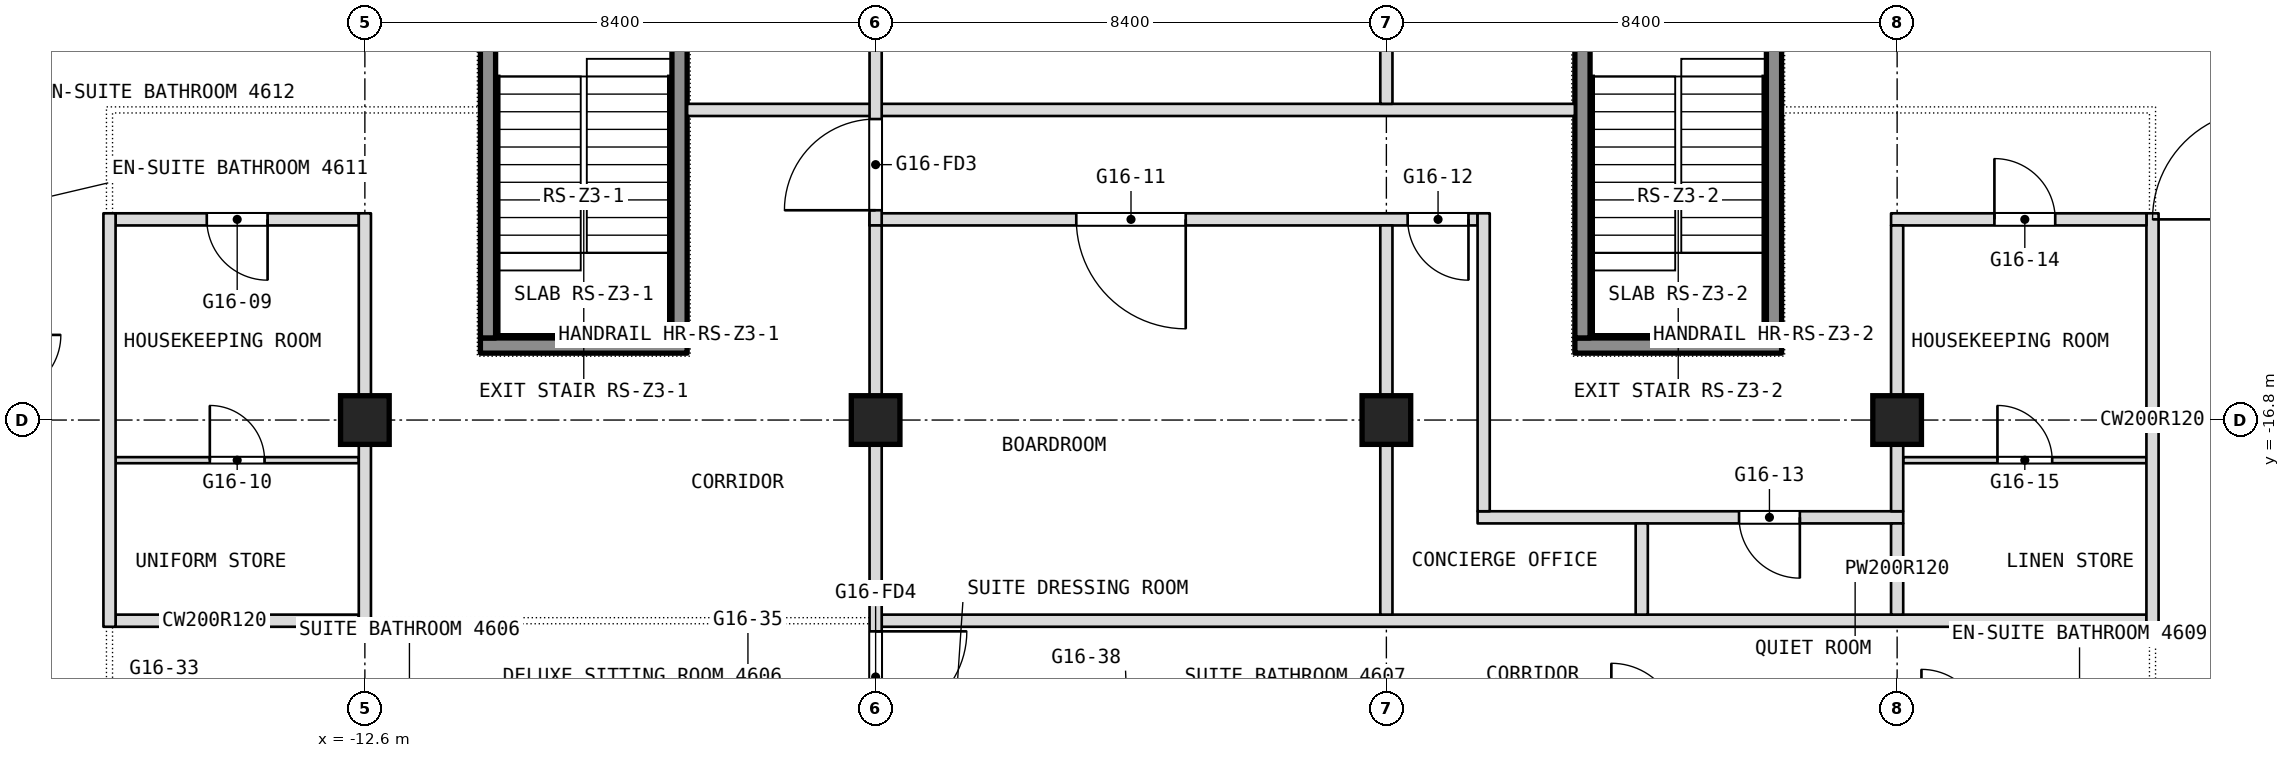
"""IFC4 building model, lengths in metres.
Left out: names, types, materials, properties, quantities, classifications, styles, units other than length and angle.
Written with IfcOpenShell. Run it as: python <this file> out.ifc"""

import sys

from ifc_helpers import new_model, si_unit, direction, frame, frame_2d, origin, origin_2d, place, context, subcontext, project, spatial, rectangle, extrude, element, fill, save


model = new_model("IFC4")
c1 = context("Model", 3, precision=1e-05, world=origin(), true_north=direction((0.0, 1.0)))
c2 = subcontext(c1, "Body", "Model", "MODEL_VIEW")
j1 = project(units=[si_unit("LENGTHUNIT", "METRE"), si_unit("PLANEANGLEUNIT", "RADIAN")], contexts=[c1])
p1 = place(None, origin())
s1 = spatial("IfcSite", under=j1, at=p1, CompositionType="ELEMENT")
p2 = place(p1, origin())
s2 = spatial("IfcBuilding", under=s1, at=p2, CompositionType="ELEMENT")
p3 = place(p2, frame((0.0, 0.0, 202.1)))
s3 = spatial("IfcBuildingStorey", under=s2, at=p3, CompositionType="ELEMENT", Elevation=202.1)
for number, where, z_axis, x_axis in (
    (1, (-12.6, -16.8, 0.0), (0.0, 0.0, 1.0), (1.0, 0.0, 0.0)),
    (2, (-4.2, -16.8, 0.0), (0.0, 0.0, 1.0), (1.0, 0.0, 0.0)),
    (3, (4.2, -16.8, 0.0), (0.0, 0.0, 1.0), (1.0, 0.0, 0.0)),
    (4, (12.6, -16.8, 0.0), (0.0, 0.0, 1.0), (1.0, 0.0, 0.0)),
):
    element("IfcColumn", number, at=place(p3, frame(where, z_axis=z_axis, x_axis=x_axis)), inside=s3, PredefinedType="COLUMN", context=c2, shape_type="SweptSolid", body=[
        extrude(rectangle(XDim=0.8, YDim=0.8, at=origin_2d()), origin(), (0.0, 0.0, 1.0), 3.6),
    ])
p4 = place(p3, frame((-16.7, -20.1, 0.0), z_axis=(0.0, 0.0, 1.0), x_axis=(1.0, 0.0, 0.0)))
e5 = element("IfcWall", 5, at=p4, inside=s3, PredefinedType="PARTITIONING", context=c2, shape_type="SweptSolid", body=[
    extrude(rectangle(XDim=4.0, YDim=0.2, at=frame_2d((2.0, 0.0))), origin(), (0.0, 0.0, 1.0), 3.34),
])
p5 = place(p3, frame((-4.1, -20.1, 0.0), z_axis=(0.0, 0.0, 1.0), x_axis=(1.0, 0.0, 0.0)))
e6 = element("IfcWall", 6, at=p5, inside=s3, PredefinedType="PARTITIONING", context=c2, shape_type="SweptSolid", body=[
    extrude(rectangle(XDim=20.8, YDim=0.2, at=frame_2d((10.4, 0.0))), origin(), (0.0, 0.0, 1.0), 3.34),
])
p6 = place(p3, frame((5.7, -18.4, 0.0), z_axis=(0.0, 0.0, 1.0), x_axis=(1.0, 0.0, 0.0)))
e7 = element("IfcWall", 7, at=p6, inside=s3, PredefinedType="PARTITIONING", context=c2, shape_type="SweptSolid", body=[
    extrude(rectangle(XDim=7.0, YDim=0.2, at=frame_2d((3.5, 0.0))), origin(), (0.0, 0.0, 1.0), 3.34),
])
p7 = place(p6, frame((4.3, 0.0, 0.0)))
e8 = element("IfcOpeningElement", 8, at=p7, cuts=e7, PredefinedType="OPENING", context=c2, shape_type="SweptSolid", body=[
    extrude(rectangle(XDim=1.0, YDim=2.1, at=frame_2d((0.5, 1.05))), frame((0.0, 0.1, 0.0), z_axis=(0.0, -1.0, 0.0), x_axis=(1.0, 0.0, 0.0)), (0.0, 0.0, 1.0), 0.2),
])
p8 = place(p3, frame((-16.7, -17.46, 0.0), z_axis=(0.0, 0.0, 1.0), x_axis=(1.0, 0.0, 0.0)))
e9 = element("IfcWall", 9, at=p8, inside=s3, PredefinedType="PARTITIONING", context=c2, shape_type="SweptSolid", body=[
    extrude(rectangle(XDim=4.0, YDim=0.1, at=frame_2d((2.0, 0.0))), origin(), (0.0, 0.0, 1.0), 3.34),
])
p9 = place(p8, frame((1.55, 0.0, 0.0)))
e10 = element("IfcOpeningElement", 10, at=p9, cuts=e9, PredefinedType="OPENING", context=c2, shape_type="SweptSolid", body=[
    extrude(rectangle(XDim=0.9, YDim=2.1, at=frame_2d((0.45, 1.05))), frame((0.0, 0.05, 0.0), z_axis=(0.0, -1.0, 0.0), x_axis=(1.0, 0.0, 0.0)), (0.0, 0.0, 1.0), 0.1),
])
p10 = place(p3, frame((12.7, -17.46, 0.0), z_axis=(0.0, 0.0, 1.0), x_axis=(1.0, 0.0, 0.0)))
e11 = element("IfcWall", 11, at=p10, inside=s3, PredefinedType="PARTITIONING", context=c2, shape_type="SweptSolid", body=[
    extrude(rectangle(XDim=4.0, YDim=0.1, at=frame_2d((2.0, 0.0))), origin(), (0.0, 0.0, 1.0), 3.34),
])
p11 = place(p10, frame((1.55, 0.0, 0.0)))
e12 = element("IfcOpeningElement", 12, at=p11, cuts=e11, PredefinedType="OPENING", context=c2, shape_type="SweptSolid", body=[
    extrude(rectangle(XDim=0.9, YDim=2.1, at=frame_2d((0.45, 1.05))), frame((0.0, 0.05, 0.0), z_axis=(0.0, -1.0, 0.0), x_axis=(1.0, 0.0, 0.0)), (0.0, 0.0, 1.0), 0.1),
])
p12 = place(p3, frame((16.8, -20.2, 0.0), z_axis=(0.0, 0.0, 1.0), x_axis=(0.0, 1.0, 0.0)))
e13 = element("IfcWall", 13, at=p12, inside=s3, PredefinedType="PARTITIONING", context=c2, shape_type="SweptSolid", body=[
    extrude(rectangle(XDim=6.8, YDim=0.2, at=frame_2d((3.4, 0.0))), origin(), (0.0, 0.0, 1.0), 3.34),
])
p13 = place(p3, frame((-16.7, -13.5, 0.0), z_axis=(0.0, 0.0, 1.0), x_axis=(1.0, 0.0, 0.0)))
e14 = element("IfcWall", 14, at=p13, inside=s3, PredefinedType="PARTITIONING", context=c2, shape_type="SweptSolid", body=[
    extrude(rectangle(XDim=4.0, YDim=0.2, at=frame_2d((2.0, 0.0))), origin(), (0.0, 0.0, 1.0), 3.34),
])
p14 = place(p13, frame((1.5, 0.0, 0.0)))
e15 = element("IfcOpeningElement", 15, at=p14, cuts=e14, PredefinedType="OPENING", context=c2, shape_type="SweptSolid", body=[
    extrude(rectangle(XDim=1.0, YDim=2.1, at=frame_2d((0.5, 1.05))), frame((0.0, 0.1, 0.0), z_axis=(0.0, -1.0, 0.0), x_axis=(1.0, 0.0, 0.0)), (0.0, 0.0, 1.0), 0.2),
])
p15 = place(p3, frame((-4.3, -13.5, 0.0), z_axis=(0.0, 0.0, 1.0), x_axis=(1.0, 0.0, 0.0)))
e16 = element("IfcWall", 16, at=p15, inside=s3, PredefinedType="PARTITIONING", context=c2, shape_type="SweptSolid", body=[
    extrude(rectangle(XDim=10.0, YDim=0.2, at=frame_2d((5.0, 0.0))), origin(), (0.0, 0.0, 1.0), 3.34),
])
p16 = place(p15, frame((3.4, 0.0, 0.0)))
e17 = element("IfcOpeningElement", 17, at=p16, cuts=e16, PredefinedType="OPENING", context=c2, shape_type="SweptSolid", body=[
    extrude(rectangle(XDim=1.8, YDim=2.1, at=frame_2d((0.9, 1.05))), frame((0.0, 0.1, 0.0), z_axis=(0.0, -1.0, 0.0), x_axis=(1.0, 0.0, 0.0)), (0.0, 0.0, 1.0), 0.2),
])
p17 = place(p15, frame((8.85, 0.0, 0.0)))
e18 = element("IfcOpeningElement", 18, at=p17, cuts=e16, PredefinedType="OPENING", context=c2, shape_type="SweptSolid", body=[
    extrude(rectangle(XDim=1.0, YDim=2.1, at=frame_2d((0.5, 1.05))), frame((0.0, 0.1, 0.0), z_axis=(0.0, -1.0, 0.0), x_axis=(1.0, 0.0, 0.0)), (0.0, 0.0, 1.0), 0.2),
])
p18 = place(p3, frame((12.5, -13.5, 0.0), z_axis=(0.0, 0.0, 1.0), x_axis=(1.0, 0.0, 0.0)))
e19 = element("IfcWall", 19, at=p18, inside=s3, PredefinedType="PARTITIONING", context=c2, shape_type="SweptSolid", body=[
    extrude(rectangle(XDim=4.2, YDim=0.2, at=frame_2d((2.1, 0.0))), origin(), (0.0, 0.0, 1.0), 3.34),
])
p19 = place(p18, frame((1.7, 0.0, 0.0)))
e20 = element("IfcOpeningElement", 20, at=p19, cuts=e19, PredefinedType="OPENING", context=c2, shape_type="SweptSolid", body=[
    extrude(rectangle(XDim=1.0, YDim=2.1, at=frame_2d((0.5, 1.05))), frame((0.0, 0.1, 0.0), z_axis=(0.0, -1.0, 0.0), x_axis=(1.0, 0.0, 0.0)), (0.0, 0.0, 1.0), 0.2),
])
p20 = place(p3, frame((12.6, -20.0, 0.0), z_axis=(0.0, 0.0, 1.0), x_axis=(0.0, 1.0, 0.0)))
e21 = element("IfcWall", 21, at=p20, inside=s3, PredefinedType="PARTITIONING", context=c2, shape_type="SweptSolid", body=[
    extrude(rectangle(XDim=1.5, YDim=0.2, at=frame_2d((0.75, 0.0))), origin(), (0.0, 0.0, 1.0), 3.34),
])
p21 = place(p3, frame((12.6, -18.3, 0.0), z_axis=(0.0, 0.0, 1.0), x_axis=(0.0, 1.0, 0.0)))
e22 = element("IfcWall", 22, at=p21, inside=s3, PredefinedType="PARTITIONING", context=c2, shape_type="SweptSolid", body=[
    extrude(rectangle(XDim=4.7, YDim=0.2, at=frame_2d((2.35, 0.0))), origin(), (0.0, 0.0, 1.0), 3.34),
])
p22 = place(p3, frame((-7.3, -11.7, 0.0), z_axis=(0.0, 0.0, 1.0), x_axis=(1.0, 0.0, 0.0)))
e23 = element("IfcWall", 23, at=p22, inside=s3, PredefinedType="PARTITIONING", context=c2, shape_type="SweptSolid", body=[
    extrude(rectangle(XDim=14.6, YDim=0.2, at=frame_2d((7.3, 0.0))), origin(), (0.0, 0.0, 1.0), 3.34),
])
p23 = place(p3, frame((8.4, -20.0, 0.0), z_axis=(0.0, 0.0, 1.0), x_axis=(0.0, 1.0, 0.0)))
e24 = element("IfcWall", 24, at=p23, inside=s3, PredefinedType="PARTITIONING", context=c2, shape_type="SweptSolid", body=[
    extrude(rectangle(XDim=1.5, YDim=0.2, at=frame_2d((0.75, 0.0))), origin(), (0.0, 0.0, 1.0), 3.34),
])
p24 = place(p3, frame((5.8, -18.3, 0.0), z_axis=(0.0, 0.0, 1.0), x_axis=(0.0, 1.0, 0.0)))
e25 = element("IfcWall", 25, at=p24, inside=s3, PredefinedType="PARTITIONING", context=c2, shape_type="SweptSolid", body=[
    extrude(rectangle(XDim=4.9, YDim=0.2, at=frame_2d((2.45, 0.0))), origin(), (0.0, 0.0, 1.0), 3.34),
])
p25 = place(p3, frame((4.2, -20.0, 0.0), z_axis=(0.0, 0.0, 1.0), x_axis=(0.0, 1.0, 0.0)))
e26 = element("IfcWall", 26, at=p25, inside=s3, PredefinedType="PARTITIONING", context=c2, shape_type="SweptSolid", body=[
    extrude(rectangle(XDim=6.4, YDim=0.2, at=frame_2d((3.2, 0.0))), origin(), (0.0, 0.0, 1.0), 3.34),
])
p26 = place(p3, frame((4.2, -11.6, 0.0), z_axis=(0.0, 0.0, 1.0), x_axis=(0.0, 1.0, 0.0)))
e27 = element("IfcWall", 27, at=p26, inside=s3, PredefinedType="PARTITIONING", context=c2, shape_type="SweptSolid", body=[
    extrude(rectangle(XDim=9.7, YDim=0.2, at=frame_2d((4.85, 0.0))), origin(), (0.0, 0.0, 1.0), 3.34),
])
p27 = place(p3, frame((-4.2, -13.6, 0.0), z_axis=(0.0, 0.0, 1.0), x_axis=(0.0, 1.0, 0.0)))
e28 = element("IfcWall", 28, at=p27, inside=s3, PredefinedType="PARTITIONING", context=c2, shape_type="SweptSolid", body=[
    extrude(rectangle(XDim=13.6, YDim=0.2, at=frame_2d((6.8, 0.0))), origin(), (0.0, 0.0, 1.0), 3.34),
])
p28 = place(p27, frame((11.95, 0.0, 0.0)))
e29 = element("IfcOpeningElement", 29, at=p28, cuts=e28, PredefinedType="OPENING", context=c2, shape_type="SweptSolid", body=[
    extrude(rectangle(XDim=1.5, YDim=2.1, at=frame_2d((0.75, 1.05))), frame((0.0, 0.1, 0.0), z_axis=(0.0, -1.0, 0.0), x_axis=(1.0, 0.0, 0.0)), (0.0, 0.0, 1.0), 0.2),
])
p29 = place(p27, frame((0.25, 0.0, 0.0)))
e30 = element("IfcOpeningElement", 30, at=p29, cuts=e28, PredefinedType="OPENING", context=c2, shape_type="SweptSolid", body=[
    extrude(rectangle(XDim=1.5, YDim=2.1, at=frame_2d((0.75, 1.05))), frame((0.0, 0.1, 0.0), z_axis=(0.0, -1.0, 0.0), x_axis=(1.0, 0.0, 0.0)), (0.0, 0.0, 1.0), 0.2),
])
p30 = place(p3, frame((-4.2, -22.0, 0.0), z_axis=(0.0, 0.0, 1.0), x_axis=(0.0, 1.0, 0.0)))
e31 = element("IfcWall", 31, at=p30, inside=s3, PredefinedType="PARTITIONING", context=c2, shape_type="SweptSolid", body=[
    extrude(rectangle(XDim=8.4, YDim=0.2, at=frame_2d((4.2, 0.0))), origin(), (0.0, 0.0, 1.0), 3.34),
])
p31 = place(p30, frame((0.225, 0.0, 0.0)))
e32 = element("IfcOpeningElement", 32, at=p31, cuts=e31, PredefinedType="OPENING", context=c2, shape_type="SweptSolid", body=[
    extrude(rectangle(XDim=1.5, YDim=2.1, at=frame_2d((0.75, 1.05))), frame((0.0, 0.1, 0.0), z_axis=(0.0, -1.0, 0.0), x_axis=(1.0, 0.0, 0.0)), (0.0, 0.0, 1.0), 0.2),
])
for number, where, z_axis, x_axis in (
    (33, (-12.6, -20.2, 0.0), (0.0, 0.0, 1.0), (0.0, 1.0, 0.0)),
    (34, (-16.8, -20.2, 0.0), (0.0, 0.0, 1.0), (0.0, 1.0, 0.0)),
):
    element("IfcWall", number, at=place(p3, frame(where, z_axis=z_axis, x_axis=x_axis)), inside=s3, PredefinedType="PARTITIONING", context=c2, shape_type="SweptSolid", body=[
        extrude(rectangle(XDim=6.8, YDim=0.2, at=frame_2d((3.4, 0.0))), origin(), (0.0, 0.0, 1.0), 3.34),
    ])
p32 = place(p3, frame((-10.7, -15.575, 0.1), z_axis=(0.0, 0.0, 1.0), x_axis=(1.0, 0.0, 0.0)))
e35 = element("IfcWall", 35, at=p32, inside=s3, PredefinedType="SHEAR", context=c2, shape_type="SweptSolid", body=[
    extrude(rectangle(XDim=3.4, YDim=0.25, at=frame_2d((1.7, 0.0))), origin(), (0.0, 0.0, 1.0), 3.6),
])
for number, where, z_axis, x_axis in (
    (36, (-10.575, -15.45, 0.1), (0.0, 0.0, 1.0), (0.0, 1.0, 0.0)),
    (37, (-7.425, -15.45, 0.1), (0.0, 0.0, 1.0), (0.0, 1.0, 0.0)),
):
    element("IfcWall", number, at=place(p3, frame(where, z_axis=z_axis, x_axis=x_axis)), inside=s3, PredefinedType="SHEAR", context=c2, shape_type="SweptSolid", body=[
        extrude(rectangle(XDim=5.7, YDim=0.25, at=frame_2d((2.85, 0.0))), origin(), (0.0, 0.0, 1.0), 3.6),
    ])
p33 = place(p3, frame((7.3, -15.575, 0.1), z_axis=(0.0, 0.0, 1.0), x_axis=(1.0, 0.0, 0.0)))
e38 = element("IfcWall", 38, at=p33, inside=s3, PredefinedType="SHEAR", context=c2, shape_type="SweptSolid", body=[
    extrude(rectangle(XDim=3.4, YDim=0.25, at=frame_2d((1.7, 0.0))), origin(), (0.0, 0.0, 1.0), 3.6),
])
for number, where, z_axis, x_axis in (
    (39, (7.425, -15.45, 0.1), (0.0, 0.0, 1.0), (0.0, 1.0, 0.0)),
    (40, (10.575, -15.45, 0.1), (0.0, 0.0, 1.0), (0.0, 1.0, 0.0)),
):
    element("IfcWall", number, at=place(p3, frame(where, z_axis=z_axis, x_axis=x_axis)), inside=s3, PredefinedType="SHEAR", context=c2, shape_type="SweptSolid", body=[
        extrude(rectangle(XDim=5.7, YDim=0.25, at=frame_2d((2.85, 0.0))), origin(), (0.0, 0.0, 1.0), 3.6),
    ])
p34 = place(p7, origin())
e41 = element("IfcDoor", 41, at=p34, inside=s3, OperationType="SINGLE_SWING_RIGHT", PredefinedType="DOOR", context=c2, shape_type="SweptSolid", body=[
    extrude(rectangle(XDim=1.0, YDim=2.1, at=frame_2d((0.5, 1.05))), frame((0.0, 0.025, 0.0), z_axis=(0.0, -1.0, 0.0), x_axis=(1.0, 0.0, 0.0)), (0.0, 0.0, 1.0), 0.05),
])
fill(e8, e41)
p35 = place(p9, origin())
e42 = element("IfcDoor", 42, at=p35, inside=s3, OperationType="SINGLE_SWING_LEFT", PredefinedType="DOOR", context=c2, shape_type="SweptSolid", body=[
    extrude(rectangle(XDim=0.9, YDim=2.1, at=frame_2d((0.45, 1.05))), frame((0.0, 0.025, 0.0), z_axis=(0.0, -1.0, 0.0), x_axis=(1.0, 0.0, 0.0)), (0.0, 0.0, 1.0), 0.05),
])
fill(e10, e42)
p36 = place(p11, origin())
e43 = element("IfcDoor", 43, at=p36, inside=s3, OperationType="SINGLE_SWING_RIGHT", PredefinedType="DOOR", context=c2, shape_type="SweptSolid", body=[
    extrude(rectangle(XDim=0.9, YDim=2.1, at=frame_2d((0.45, 1.05))), frame((0.0, 0.025, 0.0), z_axis=(0.0, -1.0, 0.0), x_axis=(1.0, 0.0, 0.0)), (0.0, 0.0, 1.0), 0.05),
])
fill(e12, e43)
p37 = place(p14, origin())
e44 = element("IfcDoor", 44, at=p37, inside=s3, OperationType="SINGLE_SWING_LEFT", PredefinedType="DOOR", context=c2, shape_type="SweptSolid", body=[
    extrude(rectangle(XDim=1.0, YDim=2.1, at=frame_2d((0.5, 1.05))), frame((0.0, 0.025, 0.0), z_axis=(0.0, -1.0, 0.0), x_axis=(1.0, 0.0, 0.0)), (0.0, 0.0, 1.0), 0.05),
])
fill(e15, e44)
p38 = place(p16, origin())
e45 = element("IfcDoor", 45, at=p38, inside=s3, OperationType="DOUBLE_DOOR_SINGLE_SWING", PredefinedType="DOOR", context=c2, shape_type="SweptSolid", body=[
    extrude(rectangle(XDim=1.8, YDim=2.1, at=frame_2d((0.9, 1.05))), frame((0.0, 0.025, 0.0), z_axis=(0.0, -1.0, 0.0), x_axis=(1.0, 0.0, 0.0)), (0.0, 0.0, 1.0), 0.05),
])
fill(e17, e45)
p39 = place(p17, origin())
e46 = element("IfcDoor", 46, at=p39, inside=s3, OperationType="SINGLE_SWING_LEFT", PredefinedType="DOOR", context=c2, shape_type="SweptSolid", body=[
    extrude(rectangle(XDim=1.0, YDim=2.1, at=frame_2d((0.5, 1.05))), frame((0.0, 0.025, 0.0), z_axis=(0.0, -1.0, 0.0), x_axis=(1.0, 0.0, 0.0)), (0.0, 0.0, 1.0), 0.05),
])
fill(e18, e46)
p40 = place(p19, origin())
e47 = element("IfcDoor", 47, at=p40, inside=s3, OperationType="SINGLE_SWING_RIGHT", PredefinedType="DOOR", context=c2, shape_type="SweptSolid", body=[
    extrude(rectangle(XDim=1.0, YDim=2.1, at=frame_2d((0.5, 1.05))), frame((0.0, 0.025, 0.0), z_axis=(0.0, -1.0, 0.0), x_axis=(1.0, 0.0, 0.0)), (0.0, 0.0, 1.0), 0.05),
])
fill(e20, e47)
p41 = place(p29, origin())
e48 = element("IfcDoor", 48, at=p41, inside=s3, OperationType="DOUBLE_DOOR_DOUBLE_SWING", PredefinedType="DOOR", context=c2, shape_type="SweptSolid", body=[
    extrude(rectangle(XDim=1.5, YDim=2.1, at=frame_2d((0.75, 1.05))), frame((0.0, 0.025, 0.0), z_axis=(0.0, -1.0, 0.0), x_axis=(1.0, 0.0, 0.0)), (0.0, 0.0, 1.0), 0.05),
])
fill(e30, e48)
p42 = place(p31, origin())
e49 = element("IfcDoor", 49, at=p42, inside=s3, OperationType="DOUBLE_DOOR_DOUBLE_SWING", PredefinedType="DOOR", context=c2, shape_type="SweptSolid", body=[
    extrude(rectangle(XDim=1.5, YDim=2.1, at=frame_2d((0.75, 1.05))), frame((0.0, 0.025, 0.0), z_axis=(0.0, -1.0, 0.0), x_axis=(1.0, 0.0, 0.0)), (0.0, 0.0, 1.0), 0.05),
])
fill(e32, e49)
save(model, sys.argv[1])
